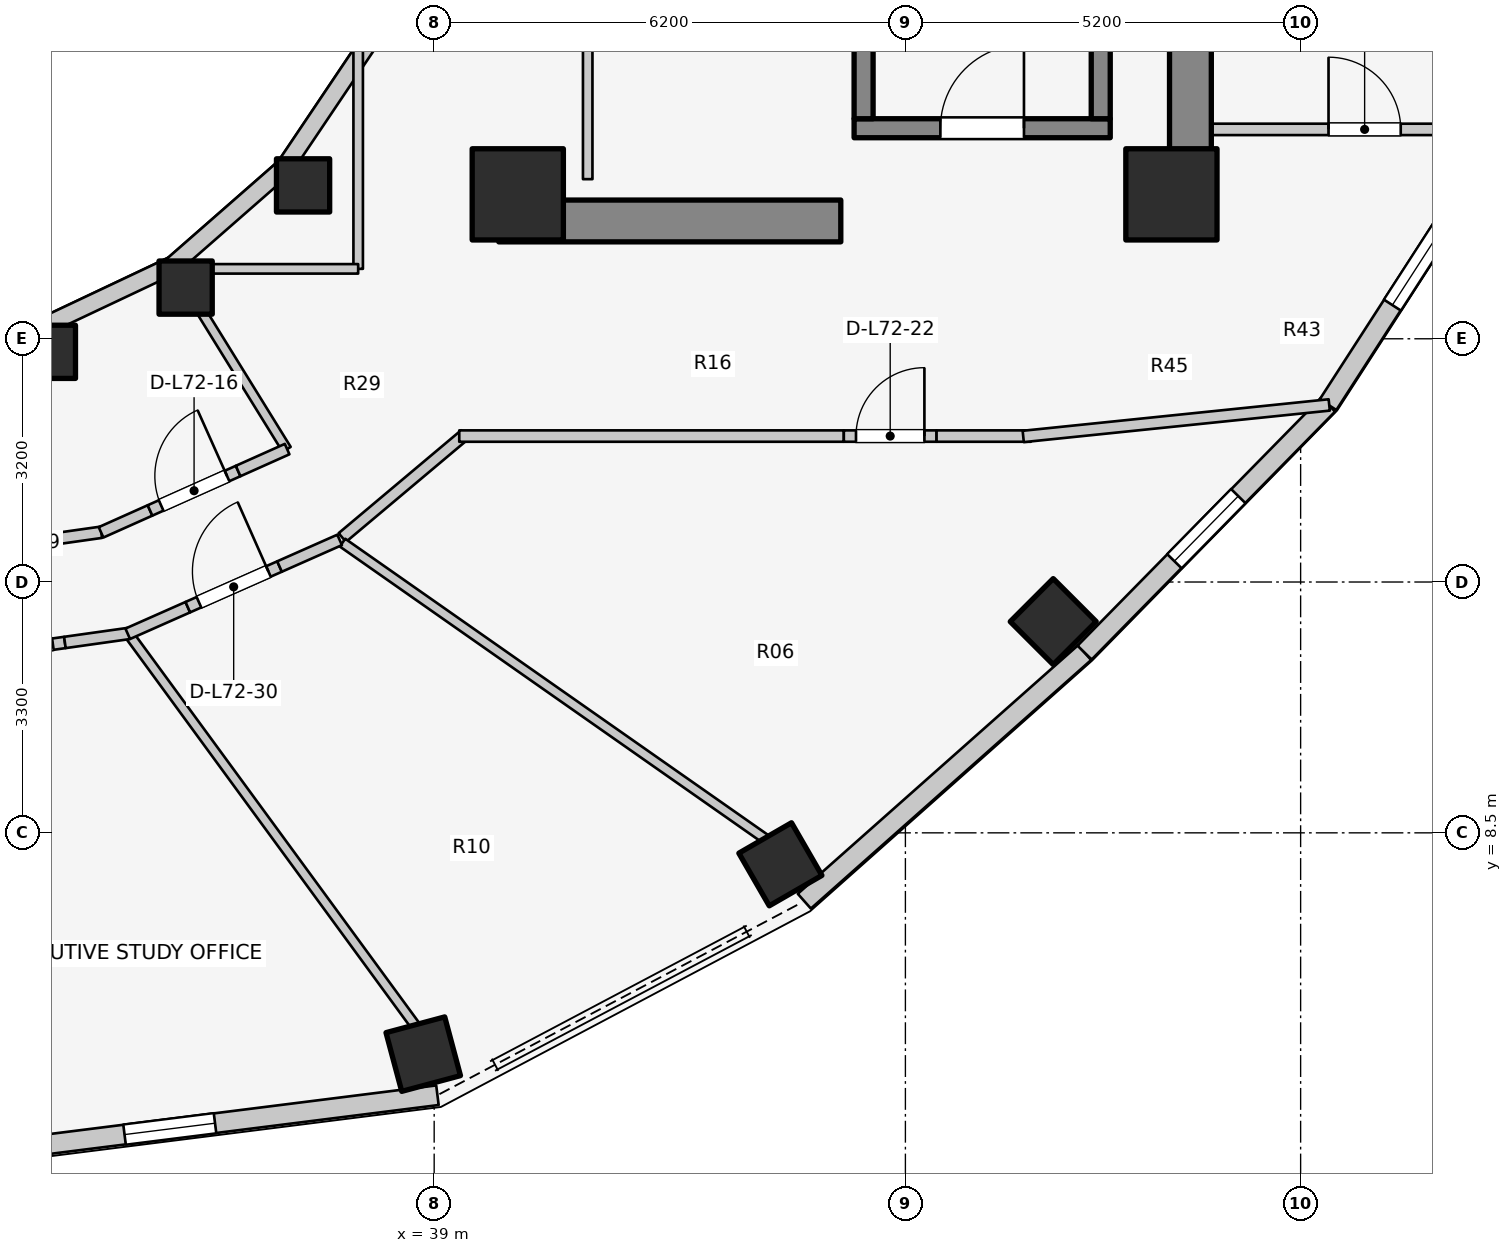
"""IFC4 building model, lengths in metres.
Left out: names, types, materials, properties, quantities, classifications, styles, units other than length and angle.
Written with IfcOpenShell. Run it as: python <this file> out.ifc"""

import sys

from ifc_helpers import new_model, si_unit, direction, frame, frame_2d, origin, origin_2d, place, context, subcontext, project, spatial, rectangle, extrude, element, fill, save


model = new_model("IFC4")
c1 = context("Model", 3, precision=1e-05, world=origin(), true_north=direction((0.0, 1.0)))
c2 = subcontext(c1, "Body", "Model", "MODEL_VIEW")
j1 = project(units=[si_unit("LENGTHUNIT", "METRE"), si_unit("PLANEANGLEUNIT", "RADIAN")], contexts=[c1])
p1 = place(None, origin())
s1 = spatial("IfcSite", under=j1, at=p1, CompositionType="ELEMENT")
p2 = place(p1, origin())
s2 = spatial("IfcBuilding", under=s1, at=p2, CompositionType="ELEMENT")
p3 = place(p2, frame((0.0, 0.0, 235.7)))
s3 = spatial("IfcBuildingStorey", under=s2, at=p3, CompositionType="ELEMENT", Elevation=235.7)
p4 = place(p3, frame((48.95, 17.05, 0.0), z_axis=(0.0, 0.0, 1.0), x_axis=(0.0, 1.0, 0.0)))
e1 = element("IfcWall", 1, at=p4, inside=s3, PredefinedType="SHEAR", context=c2, shape_type="SweptSolid", body=[
    extrude(rectangle(XDim=12.8, YDim=0.55, at=frame_2d((6.4, 0.0))), origin(), (0.0, 0.0, 1.0), 3.1),
])
p5 = place(p3, frame((39.85, 16.55, 0.0), z_axis=(0.0, 0.0, 1.0), x_axis=(1.0, 0.0, 0.0)))
e2 = element("IfcWall", 2, at=p5, inside=s3, PredefinedType="SHEAR", context=c2, shape_type="SweptSolid", body=[
    extrude(rectangle(XDim=4.5, YDim=0.55, at=frame_2d((2.25, 0.0))), origin(), (0.0, 0.0, 1.0), 3.1),
])
p6 = place(p3, frame((44.525, 17.77, 0.0), z_axis=(0.0, 0.0, 1.0), x_axis=(1.0, 0.0, 0.0)))
e3 = element("IfcWall", 3, at=p6, inside=s3, PredefinedType="SOLIDWALL", context=c2, shape_type="SweptSolid", body=[
    extrude(rectangle(XDim=3.37, YDim=0.25, at=frame_2d((1.685, 0.0))), origin(), (0.0, 0.0, 1.0), 3.1),
])
p7 = place(p6, frame((1.135, 0.0, 0.0)))
e4 = element("IfcOpeningElement", 4, at=p7, cuts=e3, PredefinedType="OPENING", context=c2, shape_type="SweptSolid", body=[
    extrude(rectangle(XDim=1.1, YDim=2.1, at=frame_2d((0.55, 1.05))), frame((0.0, 0.135, 0.0), z_axis=(0.0, -1.0, 0.0), x_axis=(1.0, 0.0, 0.0)), (0.0, 0.0, 1.0), 0.27),
])
for number, where, z_axis, x_axis in (
    (5, (44.65, 17.895, 0.0), (0.0, 0.0, 1.0), (0.0, 1.0, 0.0)),
    (6, (47.77, 17.895, 0.0), (0.0, 0.0, 1.0), (0.0, 1.0, 0.0)),
):
    element("IfcWall", number, at=place(p3, frame(where, z_axis=z_axis, x_axis=x_axis)), inside=s3, PredefinedType="SOLIDWALL", context=c2, shape_type="SweptSolid", body=[
        extrude(rectangle(XDim=7.81, YDim=0.25, at=frame_2d((3.905, 0.0))), origin(), (0.0, 0.0, 1.0), 3.1),
    ])
for number, where, z_axis, x_axis in (
    (7, (40.1, 16.9, 0.0), (0.0, 0.0, 1.0), (1.0, 0.0, 0.0)),
    (8, (48.7, 16.9, 0.0), (0.0, 0.0, 1.0), (1.0, 0.0, 0.0)),
):
    element("IfcColumn", number, at=place(p3, frame(where, z_axis=z_axis, x_axis=x_axis)), inside=s3, PredefinedType="COLUMN", context=c2, shape_type="SweptSolid", body=[
        extrude(rectangle(XDim=1.2, YDim=1.2, at=origin_2d()), origin(), (0.0, 0.0, 1.0), 3.1),
    ])
p8 = place(p3, frame((33.931, 14.828, 0.0), z_axis=(0.0, 0.0, 1.0), x_axis=(1.0, 0.0, 0.0)))
e9 = element("IfcColumn", 9, at=p8, inside=s3, PredefinedType="COLUMN", context=c2, shape_type="SweptSolid", body=[
    extrude(rectangle(XDim=0.7, YDim=0.7, at=origin_2d()), origin(), (0.0, 0.0, 1.0), 3.1),
])
p9 = place(p3, frame((38.856, 5.589, 0.0), z_axis=(0.0, 0.0, 1.0), x_axis=(0.258819045103, -0.965925826289, 0.0)))
e10 = element("IfcColumn", 10, at=p9, inside=s3, PredefinedType="COLUMN", context=c2, shape_type="SweptSolid", body=[
    extrude(rectangle(XDim=0.8, YDim=0.8, at=origin_2d()), origin(), (0.0, 0.0, 1.0), 3.1),
])
p10 = place(p3, frame((35.73, 15.673, 0.0), z_axis=(0.0, 0.0, 1.0), x_axis=(1.0, 0.0, 0.0)))
e11 = element("IfcColumn", 11, at=p10, inside=s3, PredefinedType="COLUMN", context=c2, shape_type="SweptSolid", body=[
    extrude(rectangle(XDim=0.7, YDim=0.7, at=origin_2d()), origin(), (0.0, 0.0, 1.0), 3.1),
])
p11 = place(p3, frame((43.555, 8.086, 0.0), z_axis=(0.0, 0.0, 1.0), x_axis=(0.5, -0.866025403784, 0.0)))
e12 = element("IfcColumn", 12, at=p11, inside=s3, PredefinedType="COLUMN", context=c2, shape_type="SweptSolid", body=[
    extrude(rectangle(XDim=0.8, YDim=0.8, at=origin_2d()), origin(), (0.0, 0.0, 1.0), 3.1),
])
p12 = place(p3, frame((37.275, 17.018, 0.0), z_axis=(0.0, 0.0, 1.0), x_axis=(1.0, 0.0, 0.0)))
e13 = element("IfcColumn", 13, at=p12, inside=s3, PredefinedType="COLUMN", context=c2, shape_type="SweptSolid", body=[
    extrude(rectangle(XDim=0.7, YDim=0.7, at=origin_2d()), origin(), (0.0, 0.0, 1.0), 3.1),
])
p13 = place(p3, frame((47.145, 11.279, 0.0), z_axis=(0.0, 0.0, 1.0), x_axis=(0.707106781187, -0.707106781187, 0.0)))
e14 = element("IfcColumn", 14, at=p13, inside=s3, PredefinedType="COLUMN", context=c2, shape_type="SweptSolid", body=[
    extrude(rectangle(XDim=0.8, YDim=0.8, at=origin_2d()), origin(), (0.0, 0.0, 1.0), 3.1),
])
p14 = place(p3, frame((33.843, 15.157, 0.0), z_axis=(0.0, 0.0, 1.0), x_axis=(0.904179699603, 0.427152280606, 0.0)))
e15 = element("IfcWall", 15, at=p14, inside=s3, PredefinedType="STANDARD", context=c2, shape_type="SweptSolid", body=[
    extrude(rectangle(XDim=1.899, YDim=0.23, at=frame_2d((0.95, 0.0))), origin(), (0.0, 0.0, 1.0), 1.22),
])
p15 = place(p3, frame((35.56, 15.968, 0.0), z_axis=(0.0, 0.0, 1.0), x_axis=(0.752576694707, 0.658504607869, 0.0)))
e16 = element("IfcWall", 16, at=p15, inside=s3, PredefinedType="STANDARD", context=c2, shape_type="SweptSolid", body=[
    extrude(rectangle(XDim=1.959, YDim=0.23, at=frame_2d((0.98, 0.0))), origin(), (0.0, 0.0, 1.0), 1.22),
])
p16 = place(p3, frame((37.035, 17.258, 0.0), z_axis=(0.0, 0.0, 1.0), x_axis=(0.558197800898, 0.829707909492, 0.0)))
e17 = element("IfcWall", 17, at=p16, inside=s3, PredefinedType="STANDARD", context=c2, shape_type="SweptSolid", body=[
    extrude(rectangle(XDim=2.027, YDim=0.23, at=frame_2d((1.013, 0.0))), origin(), (0.0, 0.0, 1.0), 1.22),
])
p17 = place(p3, frame((32.0, 4.162, 0.0), z_axis=(0.0, 0.0, 1.0), x_axis=(0.992180211307, 0.124813574142, 0.0)))
e18 = element("IfcWall", 18, at=p17, inside=s3, PredefinedType="STANDARD", context=c2, shape_type="SweptSolid", body=[
    extrude(rectangle(XDim=7.098, YDim=0.26, at=frame_2d((3.549, 0.0))), origin(), (0.0, 0.0, 1.0), 1.22),
])
p18 = place(p17, frame((2.949, 0.0, 0.15)))
e19 = element("IfcOpeningElement", 19, at=p18, cuts=e18, PredefinedType="OPENING", context=c2, shape_type="SweptSolid", body=[
    extrude(rectangle(XDim=1.2, YDim=0.9, at=frame_2d((0.6, 0.45))), frame((0.0, 0.14, 0.0), z_axis=(0.0, -1.0, 0.0), x_axis=(1.0, 0.0, 0.0)), (0.0, 0.0, 1.0), 0.28),
])
p19 = place(p3, frame((43.87, 7.601, 0.0), z_axis=(0.0, 0.0, 1.0), x_axis=(0.748165854006, 0.663511759428, 0.0)))
e20 = element("IfcWall", 20, at=p19, inside=s3, PredefinedType="STANDARD", context=c2, shape_type="SweptSolid", body=[
    extrude(rectangle(XDim=4.929, YDim=0.26, at=frame_2d((2.464, 0.0))), origin(), (0.0, 0.0, 1.0), 1.22),
])
p20 = place(p3, frame((47.558, 10.871, 0.0), z_axis=(0.0, 0.0, 1.0), x_axis=(0.700642973333, 0.713512034881, 0.0)))
e21 = element("IfcWall", 21, at=p20, inside=s3, PredefinedType="STANDARD", context=c2, shape_type="SweptSolid", body=[
    extrude(rectangle(XDim=4.572, YDim=0.26, at=frame_2d((2.286, 0.0))), origin(), (0.0, 0.0, 1.0), 1.22),
])
p21 = place(p20, frame((1.686, 0.0, 0.15)))
e22 = element("IfcOpeningElement", 22, at=p21, cuts=e21, PredefinedType="OPENING", context=c2, shape_type="SweptSolid", body=[
    extrude(rectangle(XDim=1.2, YDim=0.9, at=frame_2d((0.6, 0.45))), frame((0.0, 0.14, 0.0), z_axis=(0.0, -1.0, 0.0), x_axis=(1.0, 0.0, 0.0)), (0.0, 0.0, 1.0), 0.28),
])
p22 = place(p3, frame((50.761, 14.133, 0.0), z_axis=(0.0, 0.0, 1.0), x_axis=(0.542641766008, 0.839964233634, 0.0)))
e23 = element("IfcWall", 23, at=p22, inside=s3, PredefinedType="STANDARD", context=c2, shape_type="SweptSolid", body=[
    extrude(rectangle(XDim=4.319, YDim=0.26, at=frame_2d((2.16, 0.0))), origin(), (0.0, 0.0, 1.0), 1.22),
])
p23 = place(p22, frame((1.56, 0.0, 0.15)))
e24 = element("IfcOpeningElement", 24, at=p23, cuts=e23, PredefinedType="OPENING", context=c2, shape_type="SweptSolid", body=[
    extrude(rectangle(XDim=1.2, YDim=0.9, at=frame_2d((0.6, 0.45))), frame((0.0, 0.14, 0.0), z_axis=(0.0, -1.0, 0.0), x_axis=(1.0, 0.0, 0.0)), (0.0, 0.0, 1.0), 0.28),
])
p24 = place(p3, frame((41.02, 17.1, 0.0), z_axis=(0.0, 0.0, 1.0), x_axis=(0.0, 1.0, 0.0)))
e25 = element("IfcWall", 25, at=p24, inside=s3, PredefinedType="PARTITIONING", context=c2, shape_type="SweptSolid", body=[
    extrude(rectangle(XDim=2.04, YDim=0.125, at=frame_2d((1.02, 0.0))), origin(), (0.0, 0.0, 1.0), 2.575),
])
p25 = place(p3, frame((35.55, 15.985, 0.0), z_axis=(0.0, 0.0, 1.0), x_axis=(0.52592395012, -0.850531597702, 0.0)))
e26 = element("IfcWall", 26, at=p25, inside=s3, PredefinedType="PARTITIONING", context=c2, shape_type="SweptSolid", body=[
    extrude(rectangle(XDim=2.869, YDim=0.125, at=frame_2d((1.435, 0.0))), origin(), (0.0, 0.0, 1.0), 2.096),
])
p26 = place(p3, frame((31.993, 12.082, 0.0), z_axis=(0.0, 0.0, 1.0), x_axis=(0.990096156252, 0.140390887794, 0.0)))
e27 = element("IfcWall", 27, at=p26, inside=s3, PredefinedType="PARTITIONING", context=c2, shape_type="SweptSolid", body=[
    extrude(rectangle(XDim=2.654, YDim=0.15, at=frame_2d((1.327, 0.0))), origin(), (0.0, 0.0, 1.0), 2.096),
])
p27 = place(p3, frame((34.617, 12.454, 0.0), z_axis=(0.0, 0.0, 1.0), x_axis=(0.912953893823, 0.408062725269, 0.0)))
e28 = element("IfcWall", 28, at=p27, inside=s3, PredefinedType="PARTITIONING", context=c2, shape_type="SweptSolid", body=[
    extrude(rectangle(XDim=0.706, YDim=0.15, at=frame_2d((0.353, 0.0))), origin(), (0.0, 0.0, 1.0), 2.096),
])
p28 = place(p3, frame((35.261, 12.742, 0.0), z_axis=(0.0, 0.0, 1.0), x_axis=(0.912825795494, 0.408349197479, 0.0)))
e29 = element("IfcWall", 29, at=p28, inside=s3, PredefinedType="PARTITIONING", context=c2, shape_type="SweptSolid", body=[
    extrude(rectangle(XDim=1.27, YDim=0.15, at=frame_2d((0.635, 0.0))), origin(), (0.0, 0.0, 1.0), 2.16),
])
p29 = place(p28, frame((0.16, 0.0, 0.0)))
e30 = element("IfcOpeningElement", 30, at=p29, cuts=e29, PredefinedType="OPENING", context=c2, shape_type="SweptSolid", body=[
    extrude(rectangle(XDim=0.95, YDim=2.1, at=frame_2d((0.475, 1.05))), frame((0.0, 0.085, 0.0), z_axis=(0.0, -1.0, 0.0), x_axis=(1.0, 0.0, 0.0)), (0.0, 0.0, 1.0), 0.17),
])
p30 = place(p3, frame((36.421, 13.26, 0.0), z_axis=(0.0, 0.0, 1.0), x_axis=(0.912825035427, 0.40835089653, 0.0)))
e31 = element("IfcWall", 31, at=p30, inside=s3, PredefinedType="PARTITIONING", context=c2, shape_type="SweptSolid", body=[
    extrude(rectangle(XDim=0.706, YDim=0.15, at=frame_2d((0.353, 0.0))), origin(), (0.0, 0.0, 1.0), 2.575),
])
p31 = place(p3, frame((38.0, 15.92, 0.0), z_axis=(0.0, 0.0, 1.0), x_axis=(0.0, 1.0, 0.0)))
e32 = element("IfcWall", 32, at=p31, inside=s3, PredefinedType="PARTITIONING", context=c2, shape_type="SweptSolid", body=[
    extrude(rectangle(XDim=4.28, YDim=0.125, at=frame_2d((2.14, 0.0))), origin(), (0.0, 0.0, 1.0), 1.952),
])
p32 = place(p3, frame((35.4, 15.92, 0.0), z_axis=(0.0, 0.0, 1.0), x_axis=(1.0, 0.0, 0.0)))
e33 = element("IfcWall", 33, at=p32, inside=s3, PredefinedType="PARTITIONING", context=c2, shape_type="SweptSolid", body=[
    extrude(rectangle(XDim=2.6, YDim=0.125, at=frame_2d((1.3, 0.0))), origin(), (0.0, 0.0, 1.0), 1.952),
])
p33 = place(p3, frame((48.95, 17.755, 0.0), z_axis=(0.0, 0.0, 1.0), x_axis=(1.0, 0.0, 0.0)))
e34 = element("IfcWall", 34, at=p33, inside=s3, PredefinedType="PARTITIONING", context=c2, shape_type="SweptSolid", body=[
    extrude(rectangle(XDim=4.175, YDim=0.15, at=frame_2d((2.087, 0.0))), origin(), (0.0, 0.0, 1.0), 2.575),
])
p34 = place(p33, frame((1.817, 0.0, 0.0)))
e35 = element("IfcOpeningElement", 35, at=p34, cuts=e34, PredefinedType="OPENING", context=c2, shape_type="SweptSolid", body=[
    extrude(rectangle(XDim=0.95, YDim=2.1, at=frame_2d((0.475, 1.05))), frame((0.0, 0.085, 0.0), z_axis=(0.0, -1.0, 0.0), x_axis=(1.0, 0.0, 0.0)), (0.0, 0.0, 1.0), 0.17),
])
p35 = place(p3, frame((37.791, 12.385, 0.0), z_axis=(0.0, 0.0, 1.0), x_axis=(0.765677451641, 0.643224719711, 0.0)))
e36 = element("IfcWall", 36, at=p35, inside=s3, PredefinedType="PARTITIONING", context=c2, shape_type="SweptSolid", body=[
    extrude(rectangle(XDim=2.105, YDim=0.15, at=frame_2d((1.053, 0.0))), origin(), (0.0, 0.0, 1.0), 2.096),
])
p36 = place(p3, frame((39.33, 13.72, 0.0), z_axis=(0.0, 0.0, 1.0), x_axis=(1.0, 0.0, 0.0)))
e37 = element("IfcWall", 37, at=p36, inside=s3, PredefinedType="PARTITIONING", context=c2, shape_type="SweptSolid", body=[
    extrude(rectangle(XDim=5.06, YDim=0.15, at=frame_2d((2.53, 0.0))), origin(), (0.0, 0.0, 1.0), 2.096),
])
p37 = place(p3, frame((44.39, 13.72, 0.0), z_axis=(0.0, 0.0, 1.0), x_axis=(1.0, 0.0, 0.0)))
e38 = element("IfcWall", 38, at=p37, inside=s3, PredefinedType="PARTITIONING", context=c2, shape_type="SweptSolid", body=[
    extrude(rectangle(XDim=1.22, YDim=0.15, at=frame_2d((0.61, 0.0))), origin(), (0.0, 0.0, 1.0), 2.575),
])
p38 = place(p37, frame((0.16, 0.0, 0.0)))
e39 = element("IfcOpeningElement", 39, at=p38, cuts=e38, PredefinedType="OPENING", context=c2, shape_type="SweptSolid", body=[
    extrude(rectangle(XDim=0.9, YDim=2.1, at=frame_2d((0.45, 1.05))), frame((0.0, 0.085, 0.0), z_axis=(0.0, -1.0, 0.0), x_axis=(1.0, 0.0, 0.0)), (0.0, 0.0, 1.0), 0.17),
])
p39 = place(p3, frame((45.61, 13.72, 0.0), z_axis=(0.0, 0.0, 1.0), x_axis=(1.0, 0.0, 0.0)))
e40 = element("IfcWall", 40, at=p39, inside=s3, PredefinedType="PARTITIONING", context=c2, shape_type="SweptSolid", body=[
    extrude(rectangle(XDim=1.24, YDim=0.15, at=frame_2d((0.62, 0.0))), origin(), (0.0, 0.0, 1.0), 2.575),
])
p40 = place(p3, frame((46.75, 13.715, 0.0), z_axis=(0.0, 0.0, 1.0), x_axis=(0.994734711466, 0.102483431859, 0.0)))
e41 = element("IfcWall", 41, at=p40, inside=s3, PredefinedType="PARTITIONING", context=c2, shape_type="SweptSolid", body=[
    extrude(rectangle(XDim=4.047, YDim=0.15, at=frame_2d((2.024, 0.0))), origin(), (0.0, 0.0, 1.0), 1.22),
])
p41 = place(p3, frame((35.008, 11.077, 0.0), z_axis=(0.0, 0.0, 1.0), x_axis=(0.590771495169, -0.806838918555, 0.0)))
e42 = element("IfcWall", 42, at=p41, inside=s3, PredefinedType="PARTITIONING", context=c2, shape_type="SweptSolid", body=[
    extrude(rectangle(XDim=6.347, YDim=0.125, at=frame_2d((3.173, 0.0))), origin(), (0.0, 0.0, 1.0), 1.22),
])
p42 = place(p3, frame((37.794, 12.318, 0.0), z_axis=(0.0, 0.0, 1.0), x_axis=(0.819017716307, -0.573768228796, 0.0)))
e43 = element("IfcWall", 43, at=p42, inside=s3, PredefinedType="PARTITIONING", context=c2, shape_type="SweptSolid", body=[
    extrude(rectangle(XDim=6.802, YDim=0.125, at=frame_2d((3.401, 0.0))), origin(), (0.0, 0.0, 1.0), 1.22),
])
p43 = place(p3, frame((32.834, 10.821, 0.0), z_axis=(0.0, 0.0, 1.0), x_axis=(0.990228663531, 0.139453196171, 0.0)))
e44 = element("IfcWall", 44, at=p43, inside=s3, PredefinedType="PARTITIONING", context=c2, shape_type="SweptSolid", body=[
    extrude(rectangle(XDim=1.32, YDim=0.15, at=frame_2d((0.66, 0.0))), origin(), (0.0, 0.0, 1.0), 2.575),
])
p44 = place(p43, frame((0.16, 0.0, 0.0)))
e45 = element("IfcOpeningElement", 45, at=p44, cuts=e44, PredefinedType="OPENING", context=c2, shape_type="SweptSolid", body=[
    extrude(rectangle(XDim=1.0, YDim=2.1, at=frame_2d((0.5, 1.05))), frame((0.0, 0.085, 0.0), z_axis=(0.0, -1.0, 0.0), x_axis=(1.0, 0.0, 0.0)), (0.0, 0.0, 1.0), 0.17),
])
p45 = place(p3, frame((34.141, 11.005, 0.0), z_axis=(0.0, 0.0, 1.0), x_axis=(0.99022315503, 0.139492305317, 0.0)))
e46 = element("IfcWall", 46, at=p45, inside=s3, PredefinedType="PARTITIONING", context=c2, shape_type="SweptSolid", body=[
    extrude(rectangle(XDim=0.851, YDim=0.15, at=frame_2d((0.425, 0.0))), origin(), (0.0, 0.0, 1.0), 2.575),
])
p46 = place(p3, frame((34.968, 11.119, 0.0), z_axis=(0.0, 0.0, 1.0), x_axis=(0.914346402493, 0.40493290339, 0.0)))
e47 = element("IfcWall", 47, at=p46, inside=s3, PredefinedType="PARTITIONING", context=c2, shape_type="SweptSolid", body=[
    extrude(rectangle(XDim=0.865, YDim=0.15, at=frame_2d((0.432, 0.0))), origin(), (0.0, 0.0, 1.0), 2.096),
])
p47 = place(p3, frame((35.759, 11.469, 0.0), z_axis=(0.0, 0.0, 1.0), x_axis=(0.914314172667, 0.405005671145, 0.0)))
e48 = element("IfcWall", 48, at=p47, inside=s3, PredefinedType="PARTITIONING", context=c2, shape_type="SweptSolid", body=[
    extrude(rectangle(XDim=1.32, YDim=0.15, at=frame_2d((0.66, 0.0))), origin(), (0.0, 0.0, 1.0), 2.16),
])
p48 = place(p47, frame((0.16, 0.0, 0.0)))
e49 = element("IfcOpeningElement", 49, at=p48, cuts=e48, PredefinedType="OPENING", context=c2, shape_type="SweptSolid", body=[
    extrude(rectangle(XDim=1.0, YDim=2.1, at=frame_2d((0.5, 1.05))), frame((0.0, 0.085, 0.0), z_axis=(0.0, -1.0, 0.0), x_axis=(1.0, 0.0, 0.0)), (0.0, 0.0, 1.0), 0.17),
])
p49 = place(p3, frame((36.966, 12.004, 0.0), z_axis=(0.0, 0.0, 1.0), x_axis=(0.914241833088, 0.405168940853, 0.0)))
e50 = element("IfcWall", 50, at=p49, inside=s3, PredefinedType="PARTITIONING", context=c2, shape_type="SweptSolid", body=[
    extrude(rectangle(XDim=0.865, YDim=0.15, at=frame_2d((0.432, 0.0))), origin(), (0.0, 0.0, 1.0), 2.575),
])
p50 = place(p18, origin())
e51 = element("IfcWindow", 51, at=p50, inside=s3, PartitioningType="SINGLE_PANEL", PredefinedType="WINDOW", context=c2, shape_type="SweptSolid", body=[
    extrude(rectangle(XDim=1.2, YDim=0.9, at=frame_2d((0.6, 0.45))), frame((0.0, 0.03, 0.0), z_axis=(0.0, -1.0, 0.0), x_axis=(1.0, 0.0, 0.0)), (0.0, 0.0, 1.0), 0.06),
])
fill(e19, e51)
p51 = place(p21, origin())
e52 = element("IfcWindow", 52, at=p51, inside=s3, PartitioningType="SINGLE_PANEL", PredefinedType="WINDOW", context=c2, shape_type="SweptSolid", body=[
    extrude(rectangle(XDim=1.2, YDim=0.9, at=frame_2d((0.6, 0.45))), frame((0.0, 0.03, 0.0), z_axis=(0.0, -1.0, 0.0), x_axis=(1.0, 0.0, 0.0)), (0.0, 0.0, 1.0), 0.06),
])
fill(e22, e52)
p52 = place(p23, origin())
e53 = element("IfcWindow", 53, at=p52, inside=s3, PartitioningType="SINGLE_PANEL", PredefinedType="WINDOW", context=c2, shape_type="SweptSolid", body=[
    extrude(rectangle(XDim=1.2, YDim=0.9, at=frame_2d((0.6, 0.45))), frame((0.0, 0.03, 0.0), z_axis=(0.0, -1.0, 0.0), x_axis=(1.0, 0.0, 0.0)), (0.0, 0.0, 1.0), 0.06),
])
fill(e24, e53)
p53 = place(p7, origin())
e54 = element("IfcDoor", 54, at=p53, inside=s3, OperationType="SINGLE_SWING_RIGHT", PredefinedType="DOOR", context=c2, shape_type="SweptSolid", body=[
    extrude(rectangle(XDim=1.1, YDim=2.1, at=frame_2d((0.55, 1.05))), frame((0.0, 0.025, 0.0), z_axis=(0.0, -1.0, 0.0), x_axis=(1.0, 0.0, 0.0)), (0.0, 0.0, 1.0), 0.05),
])
fill(e4, e54)
p54 = place(p29, origin())
e55 = element("IfcDoor", 55, at=p54, inside=s3, OperationType="SINGLE_SWING_RIGHT", PredefinedType="DOOR", context=c2, shape_type="SweptSolid", body=[
    extrude(rectangle(XDim=0.95, YDim=2.1, at=frame_2d((0.475, 1.05))), frame((0.0, 0.025, 0.0), z_axis=(0.0, -1.0, 0.0), x_axis=(1.0, 0.0, 0.0)), (0.0, 0.0, 1.0), 0.05),
])
fill(e30, e55)
p55 = place(p34, origin())
e56 = element("IfcDoor", 56, at=p55, inside=s3, OperationType="SINGLE_SWING_LEFT", PredefinedType="DOOR", context=c2, shape_type="SweptSolid", body=[
    extrude(rectangle(XDim=0.95, YDim=2.1, at=frame_2d((0.475, 1.05))), frame((0.0, 0.025, 0.0), z_axis=(0.0, -1.0, 0.0), x_axis=(1.0, 0.0, 0.0)), (0.0, 0.0, 1.0), 0.05),
])
fill(e35, e56)
p56 = place(p38, origin())
e57 = element("IfcDoor", 57, at=p56, inside=s3, OperationType="SINGLE_SWING_RIGHT", PredefinedType="DOOR", context=c2, shape_type="SweptSolid", body=[
    extrude(rectangle(XDim=0.9, YDim=2.1, at=frame_2d((0.45, 1.05))), frame((0.0, 0.025, 0.0), z_axis=(0.0, -1.0, 0.0), x_axis=(1.0, 0.0, 0.0)), (0.0, 0.0, 1.0), 0.05),
])
fill(e39, e57)
p57 = place(p44, origin())
e58 = element("IfcDoor", 58, at=p57, inside=s3, OperationType="SINGLE_SWING_LEFT", PredefinedType="DOOR", context=c2, shape_type="SweptSolid", body=[
    extrude(rectangle(XDim=1.0, YDim=2.1, at=frame_2d((0.5, 1.05))), frame((0.0, 0.025, 0.0), z_axis=(0.0, -1.0, 0.0), x_axis=(1.0, 0.0, 0.0)), (0.0, 0.0, 1.0), 0.05),
])
fill(e45, e58)
p58 = place(p48, origin())
e59 = element("IfcDoor", 59, at=p58, inside=s3, OperationType="SINGLE_SWING_RIGHT", PredefinedType="DOOR", context=c2, shape_type="SweptSolid", body=[
    extrude(rectangle(XDim=1.0, YDim=2.1, at=frame_2d((0.5, 1.05))), frame((0.0, 0.025, 0.0), z_axis=(0.0, -1.0, 0.0), x_axis=(1.0, 0.0, 0.0)), (0.0, 0.0, 1.0), 0.05),
])
fill(e49, e59)
save(model, sys.argv[1])
